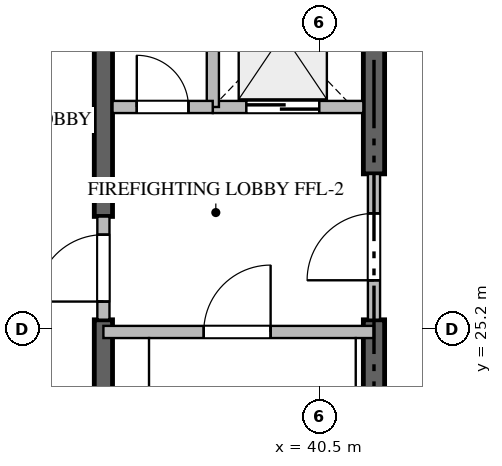
"""IFC4 building model, lengths in metres.
Left out: names, types, materials, properties, quantities, classifications, styles, units other than length and angle.
Written with IfcOpenShell. Run it as: python <this file> out.ifc"""

import sys

from ifc_helpers import new_model, si_unit, direction, frame, frame_2d, origin, place, context, subcontext, project, spatial, rectangle, extrude, source, transform, mapped, element, fill, save


model = new_model("IFC4")
c1 = context("Model", 3, precision=1e-05, world=origin(), true_north=direction((0.0, 1.0)))
c2 = subcontext(c1, "Body", "Model", "MODEL_VIEW")
j1 = project(units=[si_unit("LENGTHUNIT", "METRE"), si_unit("PLANEANGLEUNIT", "RADIAN")], contexts=[c1])
p1 = place(None, origin())
s1 = spatial("IfcSite", under=j1, at=p1, CompositionType="ELEMENT")
p2 = place(p1, origin())
s2 = spatial("IfcBuilding", under=s1, at=p2, CompositionType="ELEMENT")
p3 = place(p2, frame((0.0, 0.0, 268.2)))
s3 = spatial("IfcBuildingStorey", under=s2, at=p3, CompositionType="ELEMENT", Elevation=268.2)
p4 = place(p3, frame((41.4, 16.975, -0.26), z_axis=(0.0, 0.0, 1.0), x_axis=(0.0, 1.0, 0.0)))
e1 = element("IfcWall", 1, at=p4, inside=s3, PredefinedType="SHEAR", context=c2, shape_type="SweptSolid", body=[
    extrude(rectangle(XDim=8.375, YDim=0.35, at=frame_2d((4.188, 0.0))), origin(), (0.0, 0.0, 1.0), 3.848),
])
p5 = place(p3, frame((41.4, 27.75, -0.26), z_axis=(0.0, 0.0, 1.0), x_axis=(0.0, 1.0, 0.0)))
e2 = element("IfcWall", 2, at=p5, inside=s3, PredefinedType="SHEAR", context=c2, shape_type="SweptSolid", body=[
    extrude(rectangle(XDim=5.675, YDim=0.35, at=frame_2d((2.837, 0.0))), origin(), (0.0, 0.0, 1.0), 3.848),
])
p6 = place(p3, frame((36.95, 16.975, -0.26), z_axis=(0.0, 0.0, 1.0), x_axis=(0.0, 1.0, 0.0)))
e3 = element("IfcWall", 3, at=p6, inside=s3, PredefinedType="SHEAR", context=c2, shape_type="SweptSolid", body=[
    extrude(rectangle(XDim=8.375, YDim=0.3, at=frame_2d((4.188, 0.0))), origin(), (0.0, 0.0, 1.0), 3.848),
])
p7 = place(p3, frame((36.95, 27.05, -0.26), z_axis=(0.0, 0.0, 1.0), x_axis=(0.0, 1.0, 0.0)))
e4 = element("IfcWall", 4, at=p7, inside=s3, PredefinedType="SHEAR", context=c2, shape_type="SweptSolid", body=[
    extrude(rectangle(XDim=6.375, YDim=0.3, at=frame_2d((3.188, 0.0))), origin(), (0.0, 0.0, 1.0), 3.848),
])
p8 = place(p3, frame((36.95, 25.15, 0.0), z_axis=(0.0, 0.0, 1.0), x_axis=(1.0, 0.0, 0.0)))
e5 = element("IfcWall", 5, at=p8, inside=s3, PredefinedType="STANDARD", context=c2, shape_type="SweptSolid", body=[
    extrude(rectangle(XDim=4.45, YDim=0.2, at=frame_2d((2.225, 0.0))), origin(), (0.0, 0.0, 1.0), 3.59),
])
p9 = place(p8, frame((1.65, 0.0, 0.0)))
e6 = element("IfcOpeningElement", 6, at=p9, cuts=e5, PredefinedType="OPENING", context=c2, shape_type="SweptSolid", body=[
    extrude(rectangle(XDim=1.1, YDim=2.15, at=frame_2d((0.55, 1.075))), frame((0.0, 0.11, 0.0), z_axis=(0.0, -1.0, 0.0), x_axis=(1.0, 0.0, 0.0)), (0.0, 0.0, 1.0), 0.22),
])
p10 = place(p3, frame((38.75, 28.85, 0.0), z_axis=(0.0, 0.0, 1.0), x_axis=(1.0, 0.0, 0.0)))
e7 = element("IfcWall", 7, at=p10, inside=s3, PredefinedType="STANDARD", context=c2, shape_type="SweptSolid", body=[
    extrude(rectangle(XDim=2.475, YDim=0.2, at=frame_2d((1.238, 0.0))), origin(), (0.0, 0.0, 1.0), 3.59),
])
p11 = place(p10, frame((0.55, 0.0, 0.0)))
e8 = element("IfcOpeningElement", 8, at=p11, cuts=e7, PredefinedType="OPENING", context=c2, shape_type="SweptSolid", body=[
    extrude(rectangle(XDim=1.2, YDim=2.2, at=frame_2d((0.6, 1.1))), frame((0.0, 0.11, 0.0), z_axis=(0.0, -1.0, 0.0), x_axis=(1.0, 0.0, 0.0)), (0.0, 0.0, 1.0), 0.22),
])
p12 = place(p3, frame((38.75, 28.85, 0.0), z_axis=(0.0, 0.0, 1.0), x_axis=(0.0, 1.0, 0.0)))
e9 = element("IfcWall", 9, at=p12, inside=s3, PredefinedType="STANDARD", context=c2, shape_type="SweptSolid", body=[
    extrude(rectangle(XDim=2.5, YDim=0.2, at=frame_2d((1.25, 0.0))), origin(), (0.0, 0.0, 1.0), 3.59),
])
p13 = place(p3, frame((37.1, 28.85, 0.0), z_axis=(0.0, 0.0, 1.0), x_axis=(1.0, 0.0, 0.0)))
e10 = element("IfcWall", 10, at=p13, inside=s3, PredefinedType="STANDARD", context=c2, shape_type="SweptSolid", body=[
    extrude(rectangle(XDim=1.648, YDim=0.2, at=frame_2d((0.824, 0.0))), origin(), (0.0, 0.0, 1.0), 3.59),
])
p14 = place(p13, frame((0.399, 0.0, 0.0)))
e11 = element("IfcOpeningElement", 11, at=p14, cuts=e10, PredefinedType="OPENING", context=c2, shape_type="SweptSolid", body=[
    extrude(rectangle(XDim=0.85, YDim=2.1, at=frame_2d((0.425, 1.05))), frame((0.0, 0.11, 0.0), z_axis=(0.0, -1.0, 0.0), x_axis=(1.0, 0.0, 0.0)), (0.0, 0.0, 1.0), 0.22),
])
p15 = place(p3, frame((41.4, 25.352, 0.0), z_axis=(0.0, 0.0, 1.0), x_axis=(0.0, 1.0, 0.0)))
e12 = element("IfcWall", 12, at=p15, inside=s3, PredefinedType="STANDARD", context=c2, shape_type="SweptSolid", body=[
    extrude(rectangle(XDim=2.396, YDim=0.2, at=frame_2d((1.198, 0.0))), origin(), (0.0, 0.0, 1.0), 3.59),
])
p16 = place(p15, frame((0.648, 0.0, 0.0)))
e13 = element("IfcOpeningElement", 13, at=p16, cuts=e12, PredefinedType="OPENING", context=c2, shape_type="SweptSolid", body=[
    extrude(rectangle(XDim=1.1, YDim=2.15, at=frame_2d((0.55, 1.075))), frame((0.0, 0.11, 0.0), z_axis=(0.0, -1.0, 0.0), x_axis=(1.0, 0.0, 0.0)), (0.0, 0.0, 1.0), 0.22),
])
p17 = place(p3, frame((36.95, 25.352, 0.0), z_axis=(0.0, 0.0, 1.0), x_axis=(0.0, 1.0, 0.0)))
e14 = element("IfcWall", 14, at=p17, inside=s3, PredefinedType="STANDARD", context=c2, shape_type="SweptSolid", body=[
    extrude(rectangle(XDim=1.696, YDim=0.2, at=frame_2d((0.848, 0.0))), origin(), (0.0, 0.0, 1.0), 3.59),
])
p18 = place(p17, frame((0.298, 0.0, 0.0)))
e15 = element("IfcOpeningElement", 15, at=p18, cuts=e14, PredefinedType="OPENING", context=c2, shape_type="SweptSolid", body=[
    extrude(rectangle(XDim=1.1, YDim=2.15, at=frame_2d((0.55, 1.075))), frame((0.0, 0.11, 0.0), z_axis=(0.0, -1.0, 0.0), x_axis=(1.0, 0.0, 0.0)), (0.0, 0.0, 1.0), 0.22),
])
m1 = source(origin(), c2, "Body", "SweptSolid", [
    extrude(rectangle(XDim=1.1, YDim=2.15, at=frame_2d((0.55, 1.075))), frame((0.0, 0.025, 0.0), z_axis=(0.0, -1.0, 0.0), x_axis=(1.0, 0.0, 0.0)), (0.0, 0.0, 1.0), 0.05),
])
p19 = place(p9, origin())
e16 = element("IfcDoor", 16, at=p19, inside=s3, OperationType="SINGLE_SWING_RIGHT", PredefinedType="DOOR", context=c2, shape_type="MappedRepresentation", body=[
    mapped(m1, transform((0.0, 0.0, 0.0), scale=1.0)),
])
fill(e6, e16)
m2 = source(origin(), c2, "Body", "SweptSolid", [
    extrude(rectangle(XDim=1.2, YDim=2.2, at=frame_2d((0.6, 1.1))), frame((0.0, 0.025, 0.0), z_axis=(0.0, -1.0, 0.0), x_axis=(1.0, 0.0, 0.0)), (0.0, 0.0, 1.0), 0.05),
])
p20 = place(p11, origin())
e17 = element("IfcDoor", 17, at=p20, inside=s3, OperationType="DOUBLE_DOOR_SLIDING", PredefinedType="DOOR", context=c2, shape_type="MappedRepresentation", body=[
    mapped(m2, transform((0.0, 0.0, 0.0), scale=1.0)),
])
fill(e8, e17)
m3 = source(origin(), c2, "Body", "SweptSolid", [
    extrude(rectangle(XDim=0.85, YDim=2.1, at=frame_2d((0.425, 1.05))), frame((0.0, 0.025, 0.0), z_axis=(0.0, -1.0, 0.0), x_axis=(1.0, 0.0, 0.0)), (0.0, 0.0, 1.0), 0.05),
])
p21 = place(p14, origin())
e18 = element("IfcDoor", 18, at=p21, inside=s3, OperationType="SINGLE_SWING_LEFT", PredefinedType="DOOR", context=c2, shape_type="MappedRepresentation", body=[
    mapped(m3, transform((0.0, 0.0, 0.0), scale=1.0)),
])
fill(e11, e18)
p22 = place(p16, origin())
e19 = element("IfcDoor", 19, at=p22, inside=s3, OperationType="SINGLE_SWING_LEFT", PredefinedType="DOOR", context=c2, shape_type="MappedRepresentation", body=[
    mapped(m1, transform((0.0, 0.0, 0.0), scale=1.0)),
])
fill(e13, e19)
p23 = place(p18, origin())
e20 = element("IfcDoor", 20, at=p23, inside=s3, OperationType="SINGLE_SWING_LEFT", PredefinedType="DOOR", context=c2, shape_type="MappedRepresentation", body=[
    mapped(m1, transform((0.0, 0.0, 0.0), scale=1.0)),
])
fill(e15, e20)
save(model, sys.argv[1])
